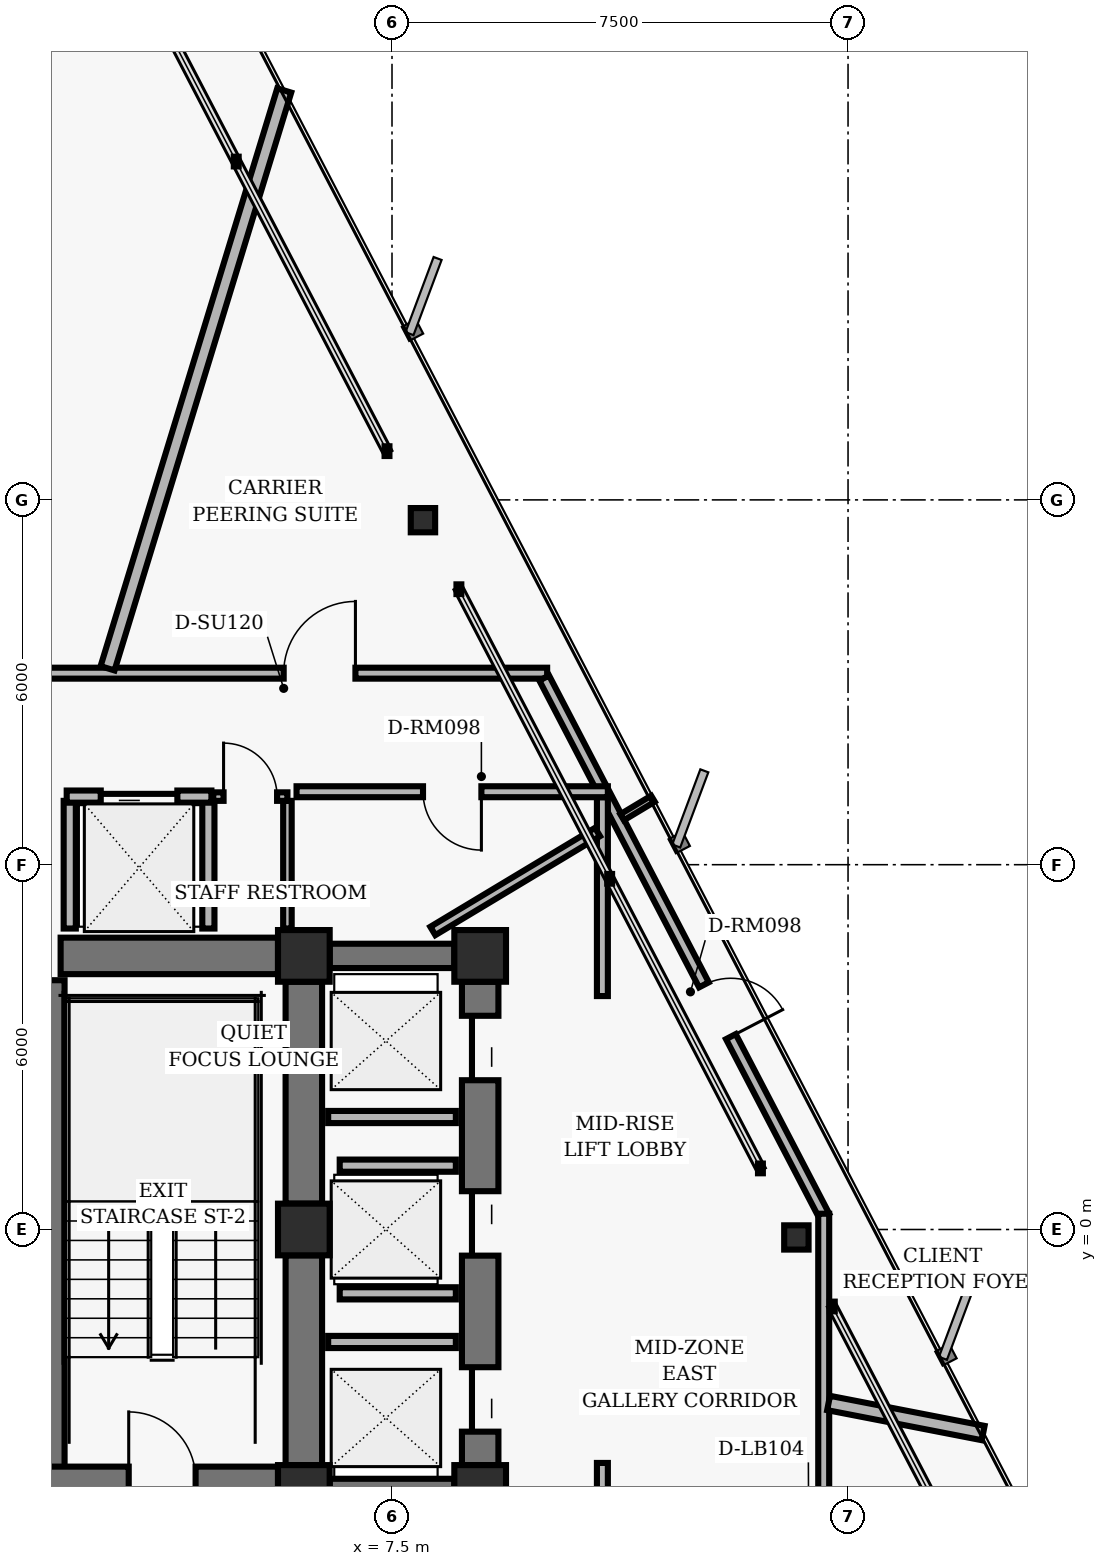
"""IFC4 building model, lengths in metres.
Left out: names, types, materials, properties, quantities, classifications, styles, units other than length and angle.
Written with IfcOpenShell. Run it as: python <this file> out.ifc"""

import sys

from ifc_helpers import new_model, si_unit, direction, frame, frame_2d, origin, origin_2d, place, context, subcontext, project, spatial, rectangle, hollow_rectangle, i_section, extrude, element, fill, save


model = new_model("IFC4")
c1 = context("Model", 3, precision=1e-05, world=origin(), true_north=direction((0.0, 1.0)))
c2 = subcontext(c1, "Body", "Model", "MODEL_VIEW")
j1 = project(units=[si_unit("LENGTHUNIT", "METRE"), si_unit("PLANEANGLEUNIT", "RADIAN")], contexts=[c1])
p1 = place(None, origin())
s1 = spatial("IfcSite", under=j1, at=p1, CompositionType="ELEMENT")
p2 = place(p1, origin())
s2 = spatial("IfcBuilding", under=s1, at=p2, CompositionType="ELEMENT")
p3 = place(p2, frame((0.0, 0.0, 141.12)))
s3 = spatial("IfcBuildingStorey", under=s2, at=p3, CompositionType="ELEMENT", Elevation=141.12)
for number, where, z_axis, x_axis in (
    (1, (6.05, 4.5, 0.0), (0.0, 0.0, 1.0), (1.0, 0.0, 0.0)),
    (2, (6.05, 0.0, 0.0), (0.0, 0.0, 1.0), (1.0, 0.0, 0.0)),
    (3, (6.05, -4.3, 0.0), (0.0, 0.0, 1.0), (1.0, 0.0, 0.0)),
    (4, (8.95, 4.5, 0.0), (0.0, 0.0, 1.0), (1.0, 0.0, 0.0)),
    (5, (8.95, -4.3, 0.0), (0.0, 0.0, 1.0), (1.0, 0.0, 0.0)),
):
    element("IfcColumn", number, at=place(p3, frame(where, z_axis=z_axis, x_axis=x_axis)), inside=s3, PredefinedType="COLUMN", context=c2, shape_type="SweptSolid", body=[
        extrude(hollow_rectangle(XDim=0.85, YDim=0.85, WallThickness=0.055, InnerFilletRadius=0.02, OuterFilletRadius=0.04, at=origin_2d()), origin(), (0.0, 0.0, 1.0), 3.04),
    ])
p4 = place(p3, frame((6.05, 0.425, 0.0), z_axis=(0.0, 0.0, 1.0), x_axis=(0.0, 1.0, 0.0)))
e6 = element("IfcWall", 6, at=p4, inside=s3, PredefinedType="SHEAR", context=c2, shape_type="SweptSolid", body=[
    extrude(rectangle(XDim=3.65, YDim=0.6, at=frame_2d((1.825, 0.0))), origin(), (0.0, 0.0, 1.0), 2.788),
])
p5 = place(p3, frame((6.05, -3.875, 0.0), z_axis=(0.0, 0.0, 1.0), x_axis=(0.0, 1.0, 0.0)))
e7 = element("IfcWall", 7, at=p5, inside=s3, PredefinedType="SHEAR", context=c2, shape_type="SweptSolid", body=[
    extrude(rectangle(XDim=3.45, YDim=0.6, at=frame_2d((1.725, 0.0))), origin(), (0.0, 0.0, 1.0), 2.788),
])
p6 = place(p3, frame((1.94, -4.1, 0.0), z_axis=(0.0, 0.0, 1.0), x_axis=(0.0, 1.0, 0.0)))
e8 = element("IfcWall", 8, at=p6, inside=s3, PredefinedType="SHEAR", context=c2, shape_type="SweptSolid", body=[
    extrude(rectangle(XDim=8.2, YDim=0.35, at=frame_2d((4.1, 0.0))), origin(), (0.0, 0.0, 1.0), 2.788),
])
p7 = place(p3, frame((-5.625, -4.1, 0.0), z_axis=(0.0, 0.0, 1.0), x_axis=(1.0, 0.0, 0.0)))
e9 = element("IfcWall", 9, at=p7, inside=s3, PredefinedType="SHEAR", context=c2, shape_type="SweptSolid", body=[
    extrude(rectangle(XDim=11.25, YDim=0.4, at=frame_2d((5.625, 0.0))), origin(), (0.0, 0.0, 1.0), 2.788),
])
p8 = place(p7, frame((1.355, 0.0, 0.0)))
e10 = element("IfcOpeningElement", 10, at=p8, cuts=e9, PredefinedType="OPENING", context=c2, shape_type="SweptSolid", body=[
    extrude(rectangle(XDim=1.1, YDim=2.04, at=frame_2d((0.55, 1.02))), frame((0.0, 0.21, 0.0), z_axis=(0.0, -1.0, 0.0), x_axis=(1.0, 0.0, 0.0)), (0.0, 0.0, 1.0), 0.42),
])
p9 = place(p7, frame((8.795, 0.0, 0.0)))
e11 = element("IfcOpeningElement", 11, at=p9, cuts=e9, PredefinedType="OPENING", context=c2, shape_type="SweptSolid", body=[
    extrude(rectangle(XDim=1.1, YDim=2.04, at=frame_2d((0.55, 1.02))), frame((0.0, 0.21, 0.0), z_axis=(0.0, -1.0, 0.0), x_axis=(1.0, 0.0, 0.0)), (0.0, 0.0, 1.0), 0.42),
])
p10 = place(p7, frame((4.095, 0.0, 0.0)))
e12 = element("IfcOpeningElement", 12, at=p10, cuts=e9, PredefinedType="OPENING", context=c2, shape_type="SweptSolid", body=[
    extrude(rectangle(XDim=1.06, YDim=2.04, at=frame_2d((0.53, 1.02))), frame((0.0, 0.21, 0.0), z_axis=(0.0, -1.0, 0.0), x_axis=(1.0, 0.0, 0.0)), (0.0, 0.0, 1.0), 0.42),
])
p11 = place(p7, frame((6.095, 0.0, 0.0)))
e13 = element("IfcOpeningElement", 13, at=p11, cuts=e9, PredefinedType="OPENING", context=c2, shape_type="SweptSolid", body=[
    extrude(rectangle(XDim=1.06, YDim=2.04, at=frame_2d((0.53, 1.02))), frame((0.0, 0.21, 0.0), z_axis=(0.0, -1.0, 0.0), x_axis=(1.0, 0.0, 0.0)), (0.0, 0.0, 1.0), 0.42),
])
p12 = place(p3, frame((2.05, 4.5, 0.0), z_axis=(0.0, 0.0, 1.0), x_axis=(1.0, 0.0, 0.0)))
e14 = element("IfcWall", 14, at=p12, inside=s3, PredefinedType="SHEAR", context=c2, shape_type="SweptSolid", body=[
    extrude(rectangle(XDim=3.575, YDim=0.6, at=frame_2d((1.788, 0.0))), origin(), (0.0, 0.0, 1.0), 2.788),
])
p13 = place(p3, frame((8.95, -3.875, 0.0), z_axis=(0.0, 0.0, 1.0), x_axis=(0.0, 1.0, 0.0)))
e15 = element("IfcWall", 15, at=p13, inside=s3, PredefinedType="SHEAR", context=c2, shape_type="SweptSolid", body=[
    extrude(rectangle(XDim=7.95, YDim=0.6, at=frame_2d((3.975, 0.0))), origin(), (0.0, 0.0, 1.0), 2.788),
])
p14 = place(p13, frame((0.55, 0.0, 0.0)))
e16 = element("IfcOpeningElement", 16, at=p14, cuts=e15, PredefinedType="OPENING", context=c2, shape_type="SweptSolid", body=[
    extrude(rectangle(XDim=1.06, YDim=2.04, at=frame_2d((0.53, 1.02))), frame((0.0, 0.31, 0.0), z_axis=(0.0, -1.0, 0.0), x_axis=(1.0, 0.0, 0.0)), (0.0, 0.0, 1.0), 0.62),
])
p15 = place(p13, frame((3.445, 0.0, 0.0)))
e17 = element("IfcOpeningElement", 17, at=p15, cuts=e15, PredefinedType="OPENING", context=c2, shape_type="SweptSolid", body=[
    extrude(rectangle(XDim=1.06, YDim=2.04, at=frame_2d((0.53, 1.02))), frame((0.0, 0.31, 0.0), z_axis=(0.0, -1.0, 0.0), x_axis=(1.0, 0.0, 0.0)), (0.0, 0.0, 1.0), 0.62),
])
p16 = place(p13, frame((6.33, 0.0, 0.0)))
e18 = element("IfcOpeningElement", 18, at=p16, cuts=e15, PredefinedType="OPENING", context=c2, shape_type="SweptSolid", body=[
    extrude(rectangle(XDim=1.06, YDim=2.04, at=frame_2d((0.53, 1.02))), frame((0.0, 0.31, 0.0), z_axis=(0.0, -1.0, 0.0), x_axis=(1.0, 0.0, 0.0)), (0.0, 0.0, 1.0), 0.62),
])
for number, where, z_axis, x_axis in (
    (19, (6.475, 4.5, 0.0), (0.0, 0.0, 1.0), (1.0, 0.0, 0.0)),
    (20, (6.475, -4.3, 0.0), (0.0, 0.0, 1.0), (1.0, 0.0, 0.0)),
):
    element("IfcWall", number, at=place(p3, frame(where, z_axis=z_axis, x_axis=x_axis)), inside=s3, PredefinedType="SHEAR", context=c2, shape_type="SweptSolid", body=[
        extrude(rectangle(XDim=2.05, YDim=0.4, at=frame_2d((1.025, 0.0))), origin(), (0.0, 0.0, 1.0), 2.788),
    ])
for number, where, z_axis, x_axis in (
    (21, (14.15, -0.131, 0.0), (0.0, 0.0, 1.0), (1.0, 0.0, 0.0)),
    (22, (8.009, 11.666, 0.0), (0.0, 0.0, 1.0), (1.0, 0.0, 0.0)),
):
    element("IfcColumn", number, at=place(p3, frame(where, z_axis=z_axis, x_axis=x_axis)), inside=s3, PredefinedType="COLUMN", context=c2, shape_type="SweptSolid", body=[
        extrude(i_section(OverallWidth=0.401, OverallDepth=0.399, WebThickness=0.025, FlangeThickness=0.04, FilletRadius=0.018, at=origin_2d()), origin(), (0.0, 0.0, 1.0), 3.04),
    ])
for number, where, z_axis, x_axis in (
    (23, (2.2, 4.95, 0.0), (0.0, 0.0, 1.0), (0.0, 1.0, 0.0)),
    (24, (4.48, 4.95, 0.0), (0.0, 0.0, 1.0), (0.0, 1.0, 0.0)),
):
    element("IfcWall", number, at=place(p3, frame(where, z_axis=z_axis, x_axis=x_axis)), inside=s3, PredefinedType="PARTITIONING", context=c2, shape_type="SweptSolid", body=[
        extrude(rectangle(XDim=2.1, YDim=0.2, at=frame_2d((1.05, 0.0))), origin(), (0.0, 0.0, 1.0), 2.763),
    ])
p17 = place(p3, frame((2.15, 7.12, 0.0), z_axis=(0.0, 0.0, 1.0), x_axis=(1.0, 0.0, 0.0)))
e25 = element("IfcWall", 25, at=p17, inside=s3, PredefinedType="PARTITIONING", context=c2, shape_type="SweptSolid", body=[
    extrude(rectangle(XDim=2.38, YDim=0.2, at=frame_2d((1.19, 0.0))), origin(), (0.0, 0.0, 1.0), 2.763),
])
p18 = place(p17, frame((0.56, 0.0, 0.0)))
e26 = element("IfcOpeningElement", 26, at=p18, cuts=e25, PredefinedType="OPENING", context=c2, shape_type="SweptSolid", body=[
    extrude(rectangle(XDim=1.26, YDim=2.06, at=frame_2d((0.63, 1.03))), frame((0.0, 0.11, 0.0), z_axis=(0.0, -1.0, 0.0), x_axis=(1.0, 0.0, 0.0)), (0.0, 0.0, 1.0), 0.22),
])
p19 = place(p3, frame((5.78, 4.95, 0.0), z_axis=(0.0, 0.0, 1.0), x_axis=(0.0, 1.0, 0.0)))
e27 = element("IfcWall", 27, at=p19, inside=s3, PredefinedType="PARTITIONING", context=c2, shape_type="SweptSolid", body=[
    extrude(rectangle(XDim=2.1, YDim=0.14, at=frame_2d((1.05, 0.0))), origin(), (0.0, 0.0, 1.0), 2.763),
])
p20 = place(p3, frame((4.56, 7.12, 0.0), z_axis=(0.0, 0.0, 1.0), x_axis=(1.0, 0.0, 0.0)))
e28 = element("IfcWall", 28, at=p20, inside=s3, PredefinedType="PARTITIONING", context=c2, shape_type="SweptSolid", body=[
    extrude(rectangle(XDim=1.22, YDim=0.14, at=frame_2d((0.61, 0.0))), origin(), (0.0, 0.0, 1.0), 2.763),
])
p21 = place(p20, frame((0.17, 0.0, 0.0)))
e29 = element("IfcOpeningElement", 29, at=p21, cuts=e28, PredefinedType="OPENING", context=c2, shape_type="SweptSolid", body=[
    extrude(rectangle(XDim=0.88, YDim=2.02, at=frame_2d((0.44, 1.01))), frame((0.0, 0.08, 0.0), z_axis=(0.0, -1.0, 0.0), x_axis=(1.0, 0.0, 0.0)), (0.0, 0.0, 1.0), 0.16),
])
for number, where, z_axis, x_axis in (
    (30, (6.45, -1.85, 0.0), (0.0, 0.0, 1.0), (1.0, 0.0, 0.0)),
    (31, (6.45, 1.85, 0.0), (0.0, 0.0, 1.0), (1.0, 0.0, 0.0)),
):
    element("IfcWall", number, at=place(p3, frame(where, z_axis=z_axis, x_axis=x_axis)), inside=s3, PredefinedType="PARTITIONING", context=c2, shape_type="SweptSolid", body=[
        extrude(rectangle(XDim=2.1, YDim=0.2, at=frame_2d((1.05, 0.0))), origin(), (0.0, 0.0, 1.0), 2.763),
    ])
for number, where, z_axis, x_axis in (
    (32, (6.64, -1.05, 0.0), (0.0, 0.0, 1.0), (1.0, 0.0, 0.0)),
    (33, (6.64, 1.05, 0.0), (0.0, 0.0, 1.0), (1.0, 0.0, 0.0)),
):
    element("IfcWall", number, at=place(p3, frame(where, z_axis=z_axis, x_axis=x_axis)), inside=s3, PredefinedType="PARTITIONING", context=c2, shape_type="SweptSolid", body=[
        extrude(rectangle(XDim=1.91, YDim=0.2, at=frame_2d((0.955, 0.0))), origin(), (0.0, 0.0, 1.0), 2.763),
    ])
p22 = place(p3, frame((-6.52, 9.15, 0.0), z_axis=(0.0, 0.0, 1.0), x_axis=(1.0, 0.0, 0.0)))
e34 = element("IfcWall", 34, at=p22, inside=s3, PredefinedType="PARTITIONING", context=c2, shape_type="SweptSolid", body=[
    extrude(rectangle(XDim=16.572, YDim=0.18, at=frame_2d((8.286, 0.0))), origin(), (0.0, 0.0, 1.0), 2.33),
])
p23 = place(p22, frame((12.238, 0.0, 0.0)))
e35 = element("IfcOpeningElement", 35, at=p23, cuts=e34, PredefinedType="OPENING", context=c2, shape_type="SweptSolid", body=[
    extrude(rectangle(XDim=1.18, YDim=2.02, at=frame_2d((0.59, 1.01))), frame((0.0, 0.1, 0.0), z_axis=(0.0, -1.0, 0.0), x_axis=(1.0, 0.0, 0.0)), (0.0, 0.0, 1.0), 0.2),
])
p24 = place(p22, frame((5.298, 0.0, 0.0)))
e36 = element("IfcOpeningElement", 36, at=p24, cuts=e34, PredefinedType="OPENING", context=c2, shape_type="SweptSolid", body=[
    extrude(rectangle(XDim=0.96, YDim=2.02, at=frame_2d((0.48, 1.01))), frame((0.0, 0.1, 0.0), z_axis=(0.0, -1.0, 0.0), x_axis=(1.0, 0.0, 0.0)), (0.0, 0.0, 1.0), 0.2),
])
p25 = place(p3, frame((10.003, 9.07, 0.0), z_axis=(0.0, 0.0, 1.0), x_axis=(0.461740291408, -0.887015165198, 0.0)))
e37 = element("IfcWall", 37, at=p25, inside=s3, PredefinedType="PARTITIONING", context=c2, shape_type="SweptSolid", body=[
    extrude(rectangle(XDim=9.976, YDim=0.18, at=frame_2d((4.988, 0.0))), origin(), (0.0, 0.0, 1.0), 2.763),
])
p26 = place(p25, frame((5.689, 0.0, 0.0)))
e38 = element("IfcOpeningElement", 38, at=p26, cuts=e37, PredefinedType="OPENING", context=c2, shape_type="SweptSolid", body=[
    extrude(rectangle(XDim=0.96, YDim=2.02, at=frame_2d((0.48, 1.01))), frame((0.0, 0.1, 0.0), z_axis=(0.0, -1.0, 0.0), x_axis=(1.0, 0.0, 0.0)), (0.0, 0.0, 1.0), 0.2),
])
p27 = place(p3, frame((14.6, 0.26, 0.0), z_axis=(0.0, 0.0, 1.0), x_axis=(0.0, -1.0, 0.0)))
e39 = element("IfcWall", 39, at=p27, inside=s3, PredefinedType="PARTITIONING", context=c2, shape_type="SweptSolid", body=[
    extrude(rectangle(XDim=7.479, YDim=0.18, at=frame_2d((3.74, 0.0))), origin(), (0.0, 0.0, 1.0), 2.763),
])
p28 = place(p27, frame((4.657, 0.0, 0.0)))
e40 = element("IfcOpeningElement", 40, at=p28, cuts=e39, PredefinedType="OPENING", context=c2, shape_type="SweptSolid", body=[
    extrude(rectangle(XDim=1.02, YDim=2.02, at=frame_2d((0.51, 1.01))), frame((0.0, 0.1, 0.0), z_axis=(0.0, -1.0, 0.0), x_axis=(1.0, 0.0, 0.0)), (0.0, 0.0, 1.0), 0.2),
])
for number, where, z_axis, x_axis in (
    (41, (10.96, -7.11, 0.0), (0.0, 0.0, 1.0), (0.0, 1.0, 0.0)),
    (42, (10.96, 3.84, 0.0), (0.0, 0.0, 1.0), (0.0, 1.0, 0.0)),
):
    element("IfcWall", number, at=place(p3, frame(where, z_axis=z_axis, x_axis=x_axis)), inside=s3, PredefinedType="PARTITIONING", context=c2, shape_type="SweptSolid", body=[
        extrude(rectangle(XDim=3.271, YDim=0.18, at=frame_2d((1.635, 0.0))), origin(), (0.0, 0.0, 1.0), 2.763),
    ])
p29 = place(p3, frame((11.05, 7.2, 0.0), z_axis=(0.0, 0.0, 1.0), x_axis=(-1.0, 0.0, 0.0)))
e43 = element("IfcWall", 43, at=p29, inside=s3, PredefinedType="PARTITIONING", context=c2, shape_type="SweptSolid", body=[
    extrude(rectangle(XDim=5.12, YDim=0.18, at=frame_2d((2.56, 0.0))), origin(), (0.0, 0.0, 1.0), 2.763),
])
p30 = place(p29, frame((2.08, 0.0, 0.0)))
e44 = element("IfcOpeningElement", 44, at=p30, cuts=e43, PredefinedType="OPENING", context=c2, shape_type="SweptSolid", body=[
    extrude(rectangle(XDim=0.96, YDim=2.02, at=frame_2d((0.48, 1.01))), frame((0.0, 0.1, 0.0), z_axis=(0.0, -1.0, 0.0), x_axis=(1.0, 0.0, 0.0)), (0.0, 0.0, 1.0), 0.2),
])
p31 = place(p3, frame((14.68, -2.854, 0.0), z_axis=(0.0, 0.0, 1.0), x_axis=(0.9816178422, -0.190857045651, 0.0)))
e45 = element("IfcWall", 45, at=p31, inside=s3, PredefinedType="PARTITIONING", context=c2, shape_type="SweptSolid", body=[
    extrude(rectangle(XDim=2.59, YDim=0.24, at=frame_2d((1.295, 0.0))), origin(), (0.0, 0.0, 1.0), 2.763),
])
p32 = place(p3, frame((8.172, 4.91, 0.0), z_axis=(0.0, 0.0, 1.0), x_axis=(0.857145019385, 0.515075155433, 0.0)))
e46 = element("IfcWall", 46, at=p32, inside=s3, PredefinedType="PARTITIONING", context=c2, shape_type="SweptSolid", body=[
    extrude(rectangle(XDim=3.16, YDim=0.16, at=frame_2d((1.58, 0.0))), origin(), (0.0, 0.0, 1.0), 2.763),
])
p33 = place(p3, frame((11.285, 6.781, 0.0), z_axis=(0.0, 0.0, 1.0), x_axis=(0.857237776814, 0.514920764782, 0.0)))
e47 = element("IfcWall", 47, at=p33, inside=s3, PredefinedType="MOVABLE", context=c2, shape_type="SweptSolid", body=[
    extrude(rectangle(XDim=0.591, YDim=0.115, at=frame_2d((0.296, 0.0))), origin(), (0.0, 0.0, 1.0), 2.763),
])
p34 = place(p3, frame((2.822, 9.23, 0.0), z_axis=(0.0, 0.0, 1.0), x_axis=(0.292353963616, 0.956310179784, 0.0)))
e48 = element("IfcWall", 48, at=p34, inside=s3, PredefinedType="PARTITIONING", context=c2, shape_type="SweptSolid", body=[
    extrude(rectangle(XDim=9.938, YDim=0.24, at=frame_2d((4.969, 0.0))), origin(), (0.0, 0.0, 1.0), 2.763),
])
p35 = place(p9, origin())
e49 = element("IfcDoor", 49, at=p35, inside=s3, OperationType="SINGLE_SWING_LEFT", PredefinedType="DOOR", context=c2, shape_type="SweptSolid", body=[
    extrude(rectangle(XDim=1.1, YDim=2.04, at=frame_2d((0.55, 1.02))), frame((0.0, 0.025, 0.0), z_axis=(0.0, -1.0, 0.0), x_axis=(1.0, 0.0, 0.0)), (0.0, 0.0, 1.0), 0.05),
])
fill(e11, e49)
p36 = place(p18, origin())
e50 = element("IfcDoor", 50, at=p36, inside=s3, OperationType="SLIDING_TO_LEFT", PredefinedType="DOOR", context=c2, shape_type="SweptSolid", body=[
    extrude(rectangle(XDim=1.26, YDim=2.06, at=frame_2d((0.63, 1.03))), frame((0.0, 0.025, 0.0), z_axis=(0.0, -1.0, 0.0), x_axis=(1.0, 0.0, 0.0)), (0.0, 0.0, 1.0), 0.05),
])
fill(e26, e50)
p37 = place(p21, origin())
e51 = element("IfcDoor", 51, at=p37, inside=s3, OperationType="SINGLE_SWING_LEFT", PredefinedType="DOOR", context=c2, shape_type="SweptSolid", body=[
    extrude(rectangle(XDim=0.88, YDim=2.02, at=frame_2d((0.44, 1.01))), frame((0.0, 0.025, 0.0), z_axis=(0.0, -1.0, 0.0), x_axis=(1.0, 0.0, 0.0)), (0.0, 0.0, 1.0), 0.05),
])
fill(e29, e51)
p38 = place(p14, origin())
e52 = element("IfcDoor", 52, at=p38, inside=s3, OperationType="SLIDING_TO_LEFT", PredefinedType="DOOR", context=c2, shape_type="SweptSolid", body=[
    extrude(rectangle(XDim=1.06, YDim=2.04, at=frame_2d((0.53, 1.02))), frame((0.0, 0.025, 0.0), z_axis=(0.0, -1.0, 0.0), x_axis=(1.0, 0.0, 0.0)), (0.0, 0.0, 1.0), 0.05),
])
fill(e16, e52)
p39 = place(p15, origin())
e53 = element("IfcDoor", 53, at=p39, inside=s3, OperationType="SLIDING_TO_RIGHT", PredefinedType="DOOR", context=c2, shape_type="SweptSolid", body=[
    extrude(rectangle(XDim=1.06, YDim=2.04, at=frame_2d((0.53, 1.02))), frame((0.0, 0.025, 0.0), z_axis=(0.0, -1.0, 0.0), x_axis=(1.0, 0.0, 0.0)), (0.0, 0.0, 1.0), 0.05),
])
fill(e17, e53)
p40 = place(p16, origin())
e54 = element("IfcDoor", 54, at=p40, inside=s3, OperationType="SLIDING_TO_LEFT", PredefinedType="DOOR", context=c2, shape_type="SweptSolid", body=[
    extrude(rectangle(XDim=1.06, YDim=2.04, at=frame_2d((0.53, 1.02))), frame((0.0, 0.025, 0.0), z_axis=(0.0, -1.0, 0.0), x_axis=(1.0, 0.0, 0.0)), (0.0, 0.0, 1.0), 0.05),
])
fill(e18, e54)
p41 = place(p26, origin())
e55 = element("IfcDoor", 55, at=p41, inside=s3, OperationType="SINGLE_SWING_RIGHT", PredefinedType="DOOR", context=c2, shape_type="SweptSolid", body=[
    extrude(rectangle(XDim=0.96, YDim=2.02, at=frame_2d((0.48, 1.01))), frame((0.0, 0.025, 0.0), z_axis=(0.0, -1.0, 0.0), x_axis=(1.0, 0.0, 0.0)), (0.0, 0.0, 1.0), 0.05),
])
fill(e38, e55)
p42 = place(p30, origin())
e56 = element("IfcDoor", 56, at=p42, inside=s3, OperationType="SINGLE_SWING_LEFT", PredefinedType="DOOR", context=c2, shape_type="SweptSolid", body=[
    extrude(rectangle(XDim=0.96, YDim=2.02, at=frame_2d((0.48, 1.01))), frame((0.0, 0.025, 0.0), z_axis=(0.0, -1.0, 0.0), x_axis=(1.0, 0.0, 0.0)), (0.0, 0.0, 1.0), 0.05),
])
fill(e44, e56)
p43 = place(p23, origin())
e57 = element("IfcDoor", 57, at=p43, inside=s3, OperationType="SINGLE_SWING_RIGHT", PredefinedType="DOOR", context=c2, shape_type="SweptSolid", body=[
    extrude(rectangle(XDim=1.18, YDim=2.02, at=frame_2d((0.59, 1.01))), frame((0.0, 0.025, 0.0), z_axis=(0.0, -1.0, 0.0), x_axis=(1.0, 0.0, 0.0)), (0.0, 0.0, 1.0), 0.05),
])
fill(e35, e57)
save(model, sys.argv[1])
